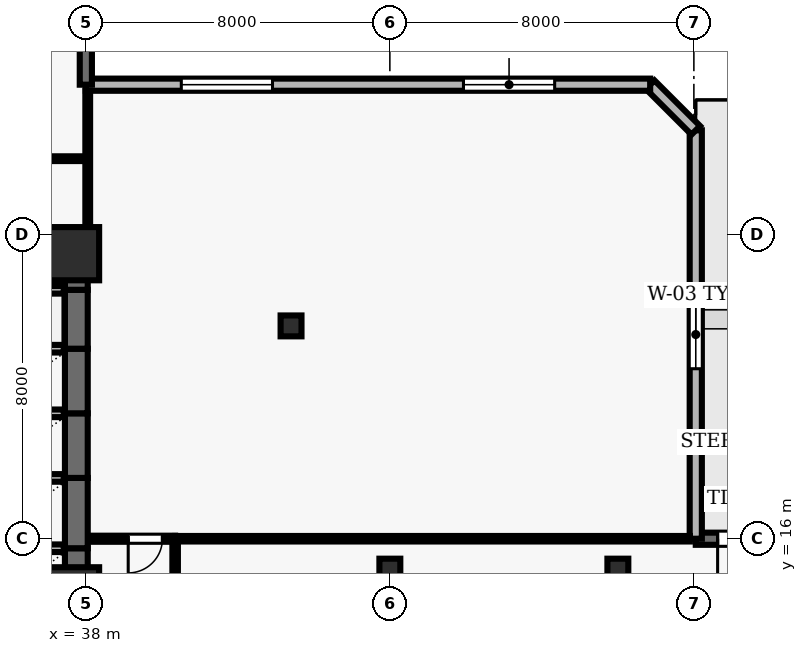
"""IFC4 building model, lengths in metres.
Left out: names, types, materials, properties, quantities, classifications, styles, units other than length and angle.
Written with IfcOpenShell. Run it as: python <this file> out.ifc"""

import sys

from ifc_helpers import new_model, si_unit, direction, frame, frame_2d, origin, origin_2d, place, context, subcontext, project, spatial, rectangle, hollow_rectangle, extrude, element, fill, save


model = new_model("IFC4")
c1 = context("Model", 3, precision=1e-05, world=origin(), true_north=direction((0.0, 1.0)))
c2 = subcontext(c1, "Body", "Model", "MODEL_VIEW")
j1 = project(units=[si_unit("LENGTHUNIT", "METRE"), si_unit("PLANEANGLEUNIT", "RADIAN")], contexts=[c1])
p1 = place(None, origin())
s1 = spatial("IfcSite", under=j1, at=p1, CompositionType="ELEMENT")
p2 = place(p1, origin())
s2 = spatial("IfcBuilding", under=s1, at=p2, CompositionType="ELEMENT")
p3 = place(p2, frame((0.0, 0.0, 42.7)))
s3 = spatial("IfcBuildingStorey", under=s2, at=p3, CompositionType="ELEMENT", Elevation=42.7)
for number, where, z_axis, x_axis in (
    (1, (37.65, 14.55, 0.0), (0.0, 0.0, 1.0), (1.0, 0.0, 0.0)),
    (2, (37.65, 23.5, 0.0), (0.0, 0.0, 1.0), (1.0, 0.0, 0.0)),
):
    element("IfcColumn", number, at=place(p3, frame(where, z_axis=z_axis, x_axis=x_axis)), inside=s3, PredefinedType="COLUMN", context=c2, shape_type="SweptSolid", body=[
        extrude(rectangle(XDim=1.4, YDim=1.4, at=origin_2d()), origin(), (0.0, 0.0, 1.0), 3.9),
    ])
for number, where, z_axis, x_axis in (
    (3, (46.0, 15.2, 0.0), (0.0, 0.0, 1.0), (1.0, 0.0, 0.0)),
    (4, (52.0, 15.2, 0.0), (0.0, 0.0, 1.0), (1.0, 0.0, 0.0)),
    (5, (43.4, 21.6, 0.0), (0.0, 0.0, 1.0), (1.0, 0.0, 0.0)),
):
    element("IfcColumn", number, at=place(p3, frame(where, z_axis=z_axis, x_axis=x_axis)), inside=s3, PredefinedType="COLUMN", context=c2, shape_type="SweptSolid", body=[
        extrude(hollow_rectangle(XDim=0.55, YDim=0.55, WallThickness=0.025, at=origin_2d()), origin(), (0.0, 0.0, 1.0), 3.9),
    ])
p4 = place(p3, frame((73.5, 16.0, 0.0), z_axis=(0.0, 0.0, 1.0), x_axis=(-1.0, 0.0, 0.0)))
e6 = element("IfcWall", 6, at=p4, inside=s3, PredefinedType="SOLIDWALL", context=c2, shape_type="SweptSolid", body=[
    extrude(rectangle(XDim=19.45, YDim=0.32, at=frame_2d((9.725, 0.0))), origin(), (0.0, 0.0, 1.0), 3.69),
])
p5 = place(p4, frame((7.3, 0.0, 0.0)))
e7 = element("IfcOpeningElement", 7, at=p5, cuts=e6, PredefinedType="OPENING", context=c2, shape_type="SweptSolid", body=[
    extrude(rectangle(XDim=1.0, YDim=2.2, at=frame_2d((0.5, 1.1))), frame((0.0, 0.17, 0.0), z_axis=(0.0, -1.0, 0.0), x_axis=(1.0, 0.0, 0.0)), (0.0, 0.0, 1.0), 0.34),
])
p6 = place(p4, frame((17.525, 0.0, 0.0)))
e8 = element("IfcOpeningElement", 8, at=p6, cuts=e6, PredefinedType="OPENING", context=c2, shape_type="SweptSolid", body=[
    extrude(rectangle(XDim=1.35, YDim=2.2, at=frame_2d((0.675, 1.1))), frame((0.0, 0.17, 0.0), z_axis=(0.0, -1.0, 0.0), x_axis=(1.0, 0.0, 0.0)), (0.0, 0.0, 1.0), 0.34),
])
p7 = place(p4, frame((2.492, 0.0, 0.9)))
e9 = element("IfcOpeningElement", 9, at=p7, cuts=e6, PredefinedType="OPENING", context=c2, shape_type="SweptSolid", body=[
    extrude(rectangle(XDim=1.5, YDim=1.6, at=frame_2d((0.75, 0.8))), frame((0.0, 0.17, 0.0), z_axis=(0.0, -1.0, 0.0), x_axis=(1.0, 0.0, 0.0)), (0.0, 0.0, 1.0), 0.34),
])
p8 = place(p3, frame((54.05, 16.0, 0.0), z_axis=(0.0, 0.0, 1.0), x_axis=(0.0, 1.0, 0.0)))
e10 = element("IfcWall", 10, at=p8, inside=s3, PredefinedType="SOLIDWALL", context=c2, shape_type="SweptSolid", body=[
    extrude(rectangle(XDim=10.747, YDim=0.32, at=frame_2d((5.374, 0.0))), origin(), (0.0, 0.0, 1.0), 3.69),
])
p9 = place(p8, frame((4.473, 0.0, 0.9)))
e11 = element("IfcOpeningElement", 11, at=p9, cuts=e10, PredefinedType="OPENING", context=c2, shape_type="SweptSolid", body=[
    extrude(rectangle(XDim=1.8, YDim=1.6, at=frame_2d((0.9, 0.8))), frame((0.0, 0.17, 0.0), z_axis=(0.0, -1.0, 0.0), x_axis=(1.0, 0.0, 0.0)), (0.0, 0.0, 1.0), 0.34),
])
p10 = place(p3, frame((54.05, 26.747, 0.0), z_axis=(0.0, 0.0, 1.0), x_axis=(-0.707106781187, 0.707106781187, 0.0)))
e12 = element("IfcWall", 12, at=p10, inside=s3, PredefinedType="SOLIDWALL", context=c2, shape_type="SweptSolid", body=[
    extrude(rectangle(XDim=1.697, YDim=0.32, at=frame_2d((0.849, 0.0))), origin(), (0.0, 0.0, 1.0), 3.69),
])
p11 = place(p3, frame((52.85, 27.947, 0.0), z_axis=(0.0, 0.0, 1.0), x_axis=(-1.0, 0.0, 0.0)))
e13 = element("IfcWall", 13, at=p11, inside=s3, PredefinedType="SOLIDWALL", context=c2, shape_type="SweptSolid", body=[
    extrude(rectangle(XDim=14.85, YDim=0.32, at=frame_2d((7.425, 0.0))), origin(), (0.0, 0.0, 1.0), 3.69),
])
p12 = place(p11, frame((2.513, 0.0, 0.9)))
e14 = element("IfcOpeningElement", 14, at=p12, cuts=e13, PredefinedType="OPENING", context=c2, shape_type="SweptSolid", body=[
    extrude(rectangle(XDim=2.4, YDim=1.6, at=frame_2d((1.2, 0.8))), frame((0.0, 0.17, 0.0), z_axis=(0.0, -1.0, 0.0), x_axis=(1.0, 0.0, 0.0)), (0.0, 0.0, 1.0), 0.34),
])
p13 = place(p11, frame((9.938, 0.0, 0.9)))
e15 = element("IfcOpeningElement", 15, at=p13, cuts=e13, PredefinedType="OPENING", context=c2, shape_type="SweptSolid", body=[
    extrude(rectangle(XDim=2.4, YDim=1.6, at=frame_2d((1.2, 0.8))), frame((0.0, 0.17, 0.0), z_axis=(0.0, -1.0, 0.0), x_axis=(1.0, 0.0, 0.0)), (0.0, 0.0, 1.0), 0.34),
])
p14 = place(p3, frame((38.0, 27.947, 0.0), z_axis=(0.0, 0.0, 1.0), x_axis=(0.0, 1.0, 0.0)))
e16 = element("IfcWall", 16, at=p14, inside=s3, PredefinedType="SOLIDWALL", context=c2, shape_type="SweptSolid", body=[
    extrude(rectangle(XDim=23.553, YDim=0.32, at=frame_2d((11.776, 0.0))), origin(), (0.0, 0.0, 1.0), 3.69),
])
p15 = place(p14, frame((9.503, 0.0, 0.0)))
e17 = element("IfcOpeningElement", 17, at=p15, cuts=e16, PredefinedType="OPENING", context=c2, shape_type="SweptSolid", body=[
    extrude(rectangle(XDim=1.0, YDim=2.2, at=frame_2d((0.5, 1.1))), frame((0.0, 0.17, 0.0), z_axis=(0.0, -1.0, 0.0), x_axis=(1.0, 0.0, 0.0)), (0.0, 0.0, 1.0), 0.34),
])
p16 = place(p14, frame((2.644, 0.0, 0.9)))
e18 = element("IfcOpeningElement", 18, at=p16, cuts=e16, PredefinedType="OPENING", context=c2, shape_type="SweptSolid", body=[
    extrude(rectangle(XDim=1.5, YDim=1.8, at=frame_2d((0.75, 0.9))), frame((0.0, 0.17, 0.0), z_axis=(0.0, -1.0, 0.0), x_axis=(1.0, 0.0, 0.0)), (0.0, 0.0, 1.0), 0.34),
])
p17 = place(p14, frame((13.971, 0.0, 0.9)))
e19 = element("IfcOpeningElement", 19, at=p17, cuts=e16, PredefinedType="OPENING", context=c2, shape_type="SweptSolid", body=[
    extrude(rectangle(XDim=1.5, YDim=1.8, at=frame_2d((0.75, 0.9))), frame((0.0, 0.17, 0.0), z_axis=(0.0, -1.0, 0.0), x_axis=(1.0, 0.0, 0.0)), (0.0, 0.0, 1.0), 0.34),
])
p18 = place(p14, frame((19.859, 0.0, 0.9)))
e20 = element("IfcOpeningElement", 20, at=p18, cuts=e16, PredefinedType="OPENING", context=c2, shape_type="SweptSolid", body=[
    extrude(rectangle(XDim=1.5, YDim=1.8, at=frame_2d((0.75, 0.9))), frame((0.0, 0.17, 0.0), z_axis=(0.0, -1.0, 0.0), x_axis=(1.0, 0.0, 0.0)), (0.0, 0.0, 1.0), 0.34),
])
p19 = place(p3, frame((37.75, 13.9, 0.0), z_axis=(0.0, 0.0, 1.0), x_axis=(0.0, 1.0, 0.0)))
e21 = element("IfcWall", 21, at=p19, inside=s3, PredefinedType="SHEAR", context=c2, shape_type="SweptSolid", body=[
    extrude(rectangle(XDim=1.85, YDim=0.6, at=frame_2d((0.925, 0.0))), origin(), (0.0, 0.0, 1.0), 3.69),
])
p20 = place(p3, frame((37.42, 15.75, 0.0), z_axis=(0.0, 0.0, 1.0), x_axis=(-1.0, 0.0, 0.0)))
e22 = element("IfcWall", 22, at=p20, inside=s3, PredefinedType="SOLIDWALL", context=c2, shape_type="SweptSolid", body=[
    extrude(rectangle(XDim=2.14, YDim=0.2, at=frame_2d((1.07, 0.0))), origin(), (0.0, 0.0, 1.0), 3.69),
])
p21 = place(p3, frame((37.75, 15.75, 0.0), z_axis=(0.0, 0.0, 1.0), x_axis=(0.0, 1.0, 0.0)))
e23 = element("IfcWall", 23, at=p21, inside=s3, PredefinedType="SHEAR", context=c2, shape_type="SweptSolid", body=[
    extrude(rectangle(XDim=1.85, YDim=0.6, at=frame_2d((0.925, 0.0))), origin(), (0.0, 0.0, 1.0), 3.69),
])
p22 = place(p3, frame((37.42, 17.6, 0.0), z_axis=(0.0, 0.0, 1.0), x_axis=(-1.0, 0.0, 0.0)))
e24 = element("IfcWall", 24, at=p22, inside=s3, PredefinedType="SOLIDWALL", context=c2, shape_type="SweptSolid", body=[
    extrude(rectangle(XDim=2.14, YDim=0.2, at=frame_2d((1.07, 0.0))), origin(), (0.0, 0.0, 1.0), 3.69),
])
p23 = place(p3, frame((37.75, 17.6, 0.0), z_axis=(0.0, 0.0, 1.0), x_axis=(0.0, 1.0, 0.0)))
e25 = element("IfcWall", 25, at=p23, inside=s3, PredefinedType="SHEAR", context=c2, shape_type="SweptSolid", body=[
    extrude(rectangle(XDim=1.7, YDim=0.6, at=frame_2d((0.85, 0.0))), origin(), (0.0, 0.0, 1.0), 3.69),
])
p24 = place(p3, frame((37.42, 19.3, 0.0), z_axis=(0.0, 0.0, 1.0), x_axis=(-1.0, 0.0, 0.0)))
e26 = element("IfcWall", 26, at=p24, inside=s3, PredefinedType="SOLIDWALL", context=c2, shape_type="SweptSolid", body=[
    extrude(rectangle(XDim=2.14, YDim=0.2, at=frame_2d((1.07, 0.0))), origin(), (0.0, 0.0, 1.0), 3.69),
])
p25 = place(p3, frame((37.75, 19.3, 0.0), z_axis=(0.0, 0.0, 1.0), x_axis=(0.0, 1.0, 0.0)))
e27 = element("IfcWall", 27, at=p25, inside=s3, PredefinedType="SHEAR", context=c2, shape_type="SweptSolid", body=[
    extrude(rectangle(XDim=1.7, YDim=0.6, at=frame_2d((0.85, 0.0))), origin(), (0.0, 0.0, 1.0), 3.69),
])
p26 = place(p3, frame((37.42, 21.0, 0.0), z_axis=(0.0, 0.0, 1.0), x_axis=(-1.0, 0.0, 0.0)))
e28 = element("IfcWall", 28, at=p26, inside=s3, PredefinedType="SOLIDWALL", context=c2, shape_type="SweptSolid", body=[
    extrude(rectangle(XDim=2.14, YDim=0.2, at=frame_2d((1.07, 0.0))), origin(), (0.0, 0.0, 1.0), 3.69),
])
p27 = place(p3, frame((37.75, 21.0, 0.0), z_axis=(0.0, 0.0, 1.0), x_axis=(0.0, 1.0, 0.0)))
e29 = element("IfcWall", 29, at=p27, inside=s3, PredefinedType="SHEAR", context=c2, shape_type="SweptSolid", body=[
    extrude(rectangle(XDim=1.55, YDim=0.6, at=frame_2d((0.775, 0.0))), origin(), (0.0, 0.0, 1.0), 3.69),
])
p28 = place(p3, frame((37.42, 22.55, 0.0), z_axis=(0.0, 0.0, 1.0), x_axis=(-1.0, 0.0, 0.0)))
e30 = element("IfcWall", 30, at=p28, inside=s3, PredefinedType="SOLIDWALL", context=c2, shape_type="SweptSolid", body=[
    extrude(rectangle(XDim=2.14, YDim=0.2, at=frame_2d((1.07, 0.0))), origin(), (0.0, 0.0, 1.0), 3.69),
])
p29 = place(p3, frame((37.75, 22.55, 0.0), z_axis=(0.0, 0.0, 1.0), x_axis=(0.0, 1.0, 0.0)))
e31 = element("IfcWall", 31, at=p29, inside=s3, PredefinedType="SHEAR", context=c2, shape_type="SweptSolid", body=[
    extrude(rectangle(XDim=1.5, YDim=0.6, at=frame_2d((0.75, 0.0))), origin(), (0.0, 0.0, 1.0), 3.69),
])
p30 = place(p3, frame((37.42, 24.05, 0.0), z_axis=(0.0, 0.0, 1.0), x_axis=(-1.0, 0.0, 0.0)))
e32 = element("IfcWall", 32, at=p30, inside=s3, PredefinedType="SOLIDWALL", context=c2, shape_type="SweptSolid", body=[
    extrude(rectangle(XDim=2.14, YDim=0.2, at=frame_2d((1.07, 0.0))), origin(), (0.0, 0.0, 1.0), 3.69),
])
p31 = place(p3, frame((35.15, 26.0, 0.0), z_axis=(0.0, 0.0, 1.0), x_axis=(1.0, 0.0, 0.0)))
e33 = element("IfcWall", 33, at=p31, inside=s3, PredefinedType="PARTITIONING", context=c2, shape_type="SweptSolid", body=[
    extrude(rectangle(XDim=2.7, YDim=0.125, at=frame_2d((1.35, 0.0))), origin(), (0.0, 0.0, 1.0), 3.69),
])
p32 = place(p3, frame((40.35, 16.0, 0.0), z_axis=(0.0, 0.0, 1.0), x_axis=(1.0, 0.0, 0.0)))
e34 = element("IfcWall", 34, at=p32, inside=s3, PredefinedType="PARTITIONING", context=c2, shape_type="SweptSolid", body=[
    extrude(rectangle(XDim=13.545, YDim=0.145, at=frame_2d((6.772, 0.0))), origin(), (0.0, 0.0, 1.0), 3.39),
])
p33 = place(p3, frame((40.35, 16.0, 0.0), z_axis=(0.0, 0.0, 1.0), x_axis=(-1.0, 0.0, 0.0)))
e35 = element("IfcWall", 35, at=p33, inside=s3, PredefinedType="PARTITIONING", context=c2, shape_type="SweptSolid", body=[
    extrude(rectangle(XDim=2.27, YDim=0.16, at=frame_2d((1.135, 0.0))), origin(), (0.0, 0.0, 1.0), 3.69),
])
p34 = place(p33, frame((0.335, 0.0, 0.0)))
e36 = element("IfcOpeningElement", 36, at=p34, cuts=e35, PredefinedType="OPENING", context=c2, shape_type="SweptSolid", body=[
    extrude(rectangle(XDim=0.9, YDim=2.1, at=frame_2d((0.45, 1.05))), frame((0.0, 0.09, 0.0), z_axis=(0.0, -1.0, 0.0), x_axis=(1.0, 0.0, 0.0)), (0.0, 0.0, 1.0), 0.18),
])
p35 = place(p3, frame((38.05, 27.792, 0.0), z_axis=(0.0, 0.0, 1.0), x_axis=(0.0, -1.0, 0.0)))
e37 = element("IfcWall", 37, at=p35, inside=s3, PredefinedType="PARTITIONING", context=c2, shape_type="SweptSolid", body=[
    extrude(rectangle(XDim=3.742, YDim=0.125, at=frame_2d((1.871, 0.0))), origin(), (0.0, 0.0, 1.0), 3.055),
])
p36 = place(p3, frame((40.35, 10.418, 0.0), z_axis=(0.0, 0.0, 1.0), x_axis=(0.0, 1.0, 0.0)))
e38 = element("IfcWall", 38, at=p36, inside=s3, PredefinedType="PARTITIONING", context=c2, shape_type="SweptSolid", body=[
    extrude(rectangle(XDim=5.507, YDim=0.145, at=frame_2d((2.753, 0.0))), origin(), (0.0, 0.0, 1.0), 3.277),
])
p37 = place(p6, origin())
e39 = element("IfcDoor", 39, at=p37, inside=s3, OperationType="SINGLE_SWING_RIGHT", PredefinedType="DOOR", context=c2, shape_type="SweptSolid", body=[
    extrude(rectangle(XDim=1.35, YDim=2.2, at=frame_2d((0.675, 1.1))), frame((0.0, 0.025, 0.0), z_axis=(0.0, -1.0, 0.0), x_axis=(1.0, 0.0, 0.0)), (0.0, 0.0, 1.0), 0.05),
])
fill(e8, e39)
p38 = place(p9, origin())
e40 = element("IfcWindow", 40, at=p38, inside=s3, PartitioningType="SINGLE_PANEL", PredefinedType="WINDOW", context=c2, shape_type="SweptSolid", body=[
    extrude(rectangle(XDim=1.8, YDim=1.6, at=frame_2d((0.9, 0.8))), frame((0.0, 0.03, 0.0), z_axis=(0.0, -1.0, 0.0), x_axis=(1.0, 0.0, 0.0)), (0.0, 0.0, 1.0), 0.06),
])
fill(e11, e40)
p39 = place(p12, origin())
e41 = element("IfcWindow", 41, at=p39, inside=s3, PartitioningType="SINGLE_PANEL", PredefinedType="WINDOW", context=c2, shape_type="SweptSolid", body=[
    extrude(rectangle(XDim=2.4, YDim=1.6, at=frame_2d((1.2, 0.8))), frame((0.0, 0.03, 0.0), z_axis=(0.0, -1.0, 0.0), x_axis=(1.0, 0.0, 0.0)), (0.0, 0.0, 1.0), 0.06),
])
fill(e14, e41)
p40 = place(p13, origin())
e42 = element("IfcWindow", 42, at=p40, inside=s3, PartitioningType="SINGLE_PANEL", PredefinedType="WINDOW", context=c2, shape_type="SweptSolid", body=[
    extrude(rectangle(XDim=2.4, YDim=1.6, at=frame_2d((1.2, 0.8))), frame((0.0, 0.03, 0.0), z_axis=(0.0, -1.0, 0.0), x_axis=(1.0, 0.0, 0.0)), (0.0, 0.0, 1.0), 0.06),
])
fill(e15, e42)
p41 = place(p34, origin())
e43 = element("IfcDoor", 43, at=p41, inside=s3, OperationType="SINGLE_SWING_RIGHT", PredefinedType="DOOR", context=c2, shape_type="SweptSolid", body=[
    extrude(rectangle(XDim=0.9, YDim=2.1, at=frame_2d((0.45, 1.05))), frame((0.0, 0.025, 0.0), z_axis=(0.0, -1.0, 0.0), x_axis=(1.0, 0.0, 0.0)), (0.0, 0.0, 1.0), 0.05),
])
fill(e36, e43)
save(model, sys.argv[1])
